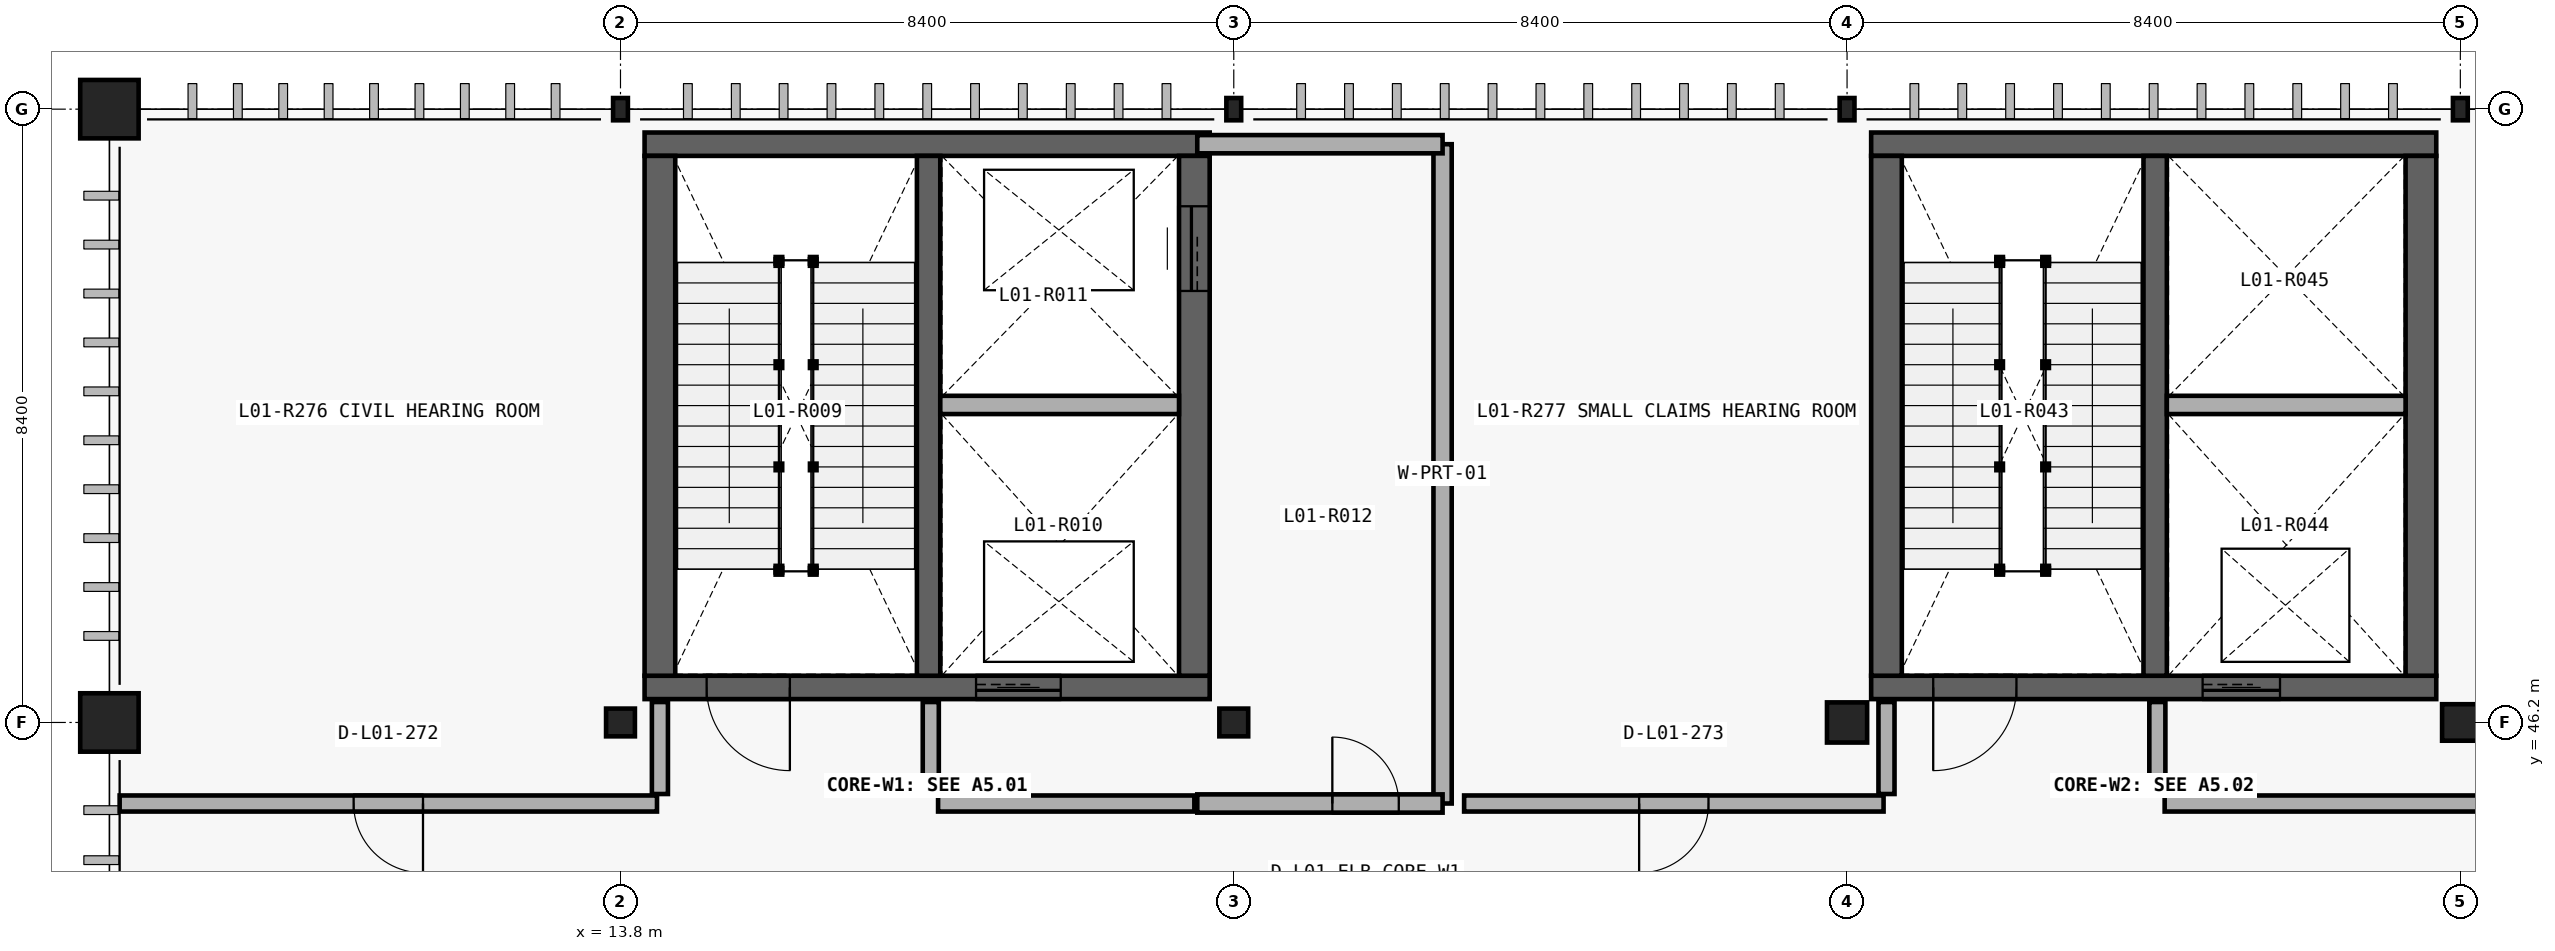
"""IFC4 building model, lengths in metres.
Left out: names, types, materials, properties, quantities, classifications, styles, units other than length and angle.
Written with IfcOpenShell. Run it as: python <this file> out.ifc"""

import sys

from ifc_helpers import new_model, si_unit, direction, frame, frame_2d, origin_with_axes, origin_2d_with_axis, place, context, subcontext, project, spatial, rectangle, hollow_rectangle, circle, i_section, extrude, element, fill, save


model = new_model("IFC4")
c1 = context("Model", 3, precision=1e-05, world=origin_with_axes(), true_north=direction((0.0, 1.0)))
c2 = subcontext(c1, "Body", "Model", "MODEL_VIEW")
j1 = project(units=[si_unit("LENGTHUNIT", "METRE"), si_unit("PLANEANGLEUNIT", "RADIAN")], contexts=[c1])
p1 = place(None, origin_with_axes())
s1 = spatial("IfcSite", under=j1, at=p1, CompositionType="ELEMENT")
p2 = place(p1, origin_with_axes())
s2 = spatial("IfcBuilding", under=s1, at=p2, CompositionType="ELEMENT")
p3 = place(p2, frame((0.0, 0.0, 5.4), z_axis=(0.0, 0.0, 1.0), x_axis=(1.0, 0.0, 0.0)))
s3 = spatial("IfcBuildingStorey", under=s2, at=p3, CompositionType="ELEMENT", Elevation=5.4)
p4 = place(None, frame((14.13, 46.68, 5.4), z_axis=(0.0, 0.0, 1.0), x_axis=(1.0, 0.0, 0.0)))
e1 = element("IfcWall", 1, at=p4, inside=s3, PredefinedType="SHEAR", context=c2, shape_type="SweptSolid", body=[
    extrude(rectangle(XDim=7.74, YDim=0.32, at=frame_2d((3.87, 0.0), x_axis=(1.0, 0.0))), origin_with_axes(), (0.0, 0.0, 1.0), 5.4),
])
p5 = place(None, frame((15.55, 46.68, 5.4), z_axis=(0.0, 0.0, 1.0), x_axis=(1.0, 0.0, 0.0)))
e2 = element("IfcOpeningElement", 2, at=p5, cuts=e1, PredefinedType="OPENING", context=c2, shape_type="SweptSolid", body=[
    extrude(rectangle(XDim=1.14, YDim=2.18, at=frame_2d((0.0, 1.09), x_axis=(1.0, 0.0))), frame((0.0, 0.17, 0.0), z_axis=(0.0, -1.0, 0.0), x_axis=(1.0, 0.0, 0.0)), (0.0, 0.0, 1.0), 0.34),
])
p6 = place(None, frame((19.25, 46.68, 5.4), z_axis=(0.0, 0.0, 1.0), x_axis=(1.0, 0.0, 0.0)))
e3 = element("IfcOpeningElement", 3, at=p6, cuts=e1, PredefinedType="OPENING", context=c2, shape_type="SweptSolid", body=[
    extrude(rectangle(XDim=1.16, YDim=2.2, at=frame_2d((0.0, 1.1), x_axis=(1.0, 0.0))), frame((0.0, 0.17, 0.0), z_axis=(0.0, -1.0, 0.0), x_axis=(1.0, 0.0, 0.0)), (0.0, 0.0, 1.0), 0.34),
])
p7 = place(None, frame((21.87, 54.12, 5.4), z_axis=(0.0, 0.0, 1.0), x_axis=(-1.0, 0.0, 0.0)))
e4 = element("IfcWall", 4, at=p7, inside=s3, PredefinedType="SHEAR", context=c2, shape_type="SweptSolid", body=[
    extrude(rectangle(XDim=7.74, YDim=0.32, at=frame_2d((3.87, 0.0), x_axis=(1.0, 0.0))), origin_with_axes(), (0.0, 0.0, 1.0), 5.4),
])
p8 = place(None, frame((21.66, 46.84, 5.4), z_axis=(0.0, 0.0, 1.0), x_axis=(0.0, 1.0, 0.0)))
e5 = element("IfcWall", 5, at=p8, inside=s3, PredefinedType="SHEAR", context=c2, shape_type="SweptSolid", body=[
    extrude(rectangle(XDim=7.12, YDim=0.42, at=frame_2d((3.56, 0.0), x_axis=(1.0, 0.0))), origin_with_axes(), (0.0, 0.0, 1.0), 5.4),
])
p9 = place(None, frame((21.66, 52.69, 5.4), z_axis=(0.0, 0.0, 1.0), x_axis=(0.0, 1.0, 0.0)))
e6 = element("IfcOpeningElement", 6, at=p9, cuts=e5, PredefinedType="OPENING", context=c2, shape_type="SweptSolid", body=[
    extrude(rectangle(XDim=1.16, YDim=2.2, at=frame_2d((0.0, 1.1), x_axis=(1.0, 0.0))), frame((0.0, 0.22, 0.0), z_axis=(0.0, -1.0, 0.0), x_axis=(1.0, 0.0, 0.0)), (0.0, 0.0, 1.0), 0.44),
])
p10 = place(None, frame((14.34, 53.96, 5.4), z_axis=(0.0, 0.0, 1.0), x_axis=(0.0, -1.0, 0.0)))
e7 = element("IfcWall", 7, at=p10, inside=s3, PredefinedType="SHEAR", context=c2, shape_type="SweptSolid", body=[
    extrude(rectangle(XDim=7.12, YDim=0.42, at=frame_2d((3.56, 0.0), x_axis=(1.0, 0.0))), origin_with_axes(), (0.0, 0.0, 1.0), 5.4),
])
p11 = place(None, frame((18.02, 46.84, 5.4), z_axis=(0.0, 0.0, 1.0), x_axis=(0.0, 1.0, 0.0)))
e8 = element("IfcWall", 8, at=p11, inside=s3, PredefinedType="SHEAR", context=c2, shape_type="SweptSolid", body=[
    extrude(rectangle(XDim=7.12, YDim=0.32, at=frame_2d((3.56, 0.0), x_axis=(1.0, 0.0))), origin_with_axes(), (0.0, 0.0, 1.0), 5.4),
])
p12 = place(None, frame((18.18, 50.549, 5.4), z_axis=(0.0, 0.0, 1.0), x_axis=(1.0, 0.0, 0.0)))
e9 = element("IfcWall", 9, at=p12, inside=s3, PredefinedType="PARTITIONING", context=c2, shape_type="SweptSolid", body=[
    extrude(rectangle(XDim=3.27, YDim=0.25, at=frame_2d((1.635, 0.0), x_axis=(1.0, 0.0))), origin_with_axes(), (0.0, 0.0, 1.0), 5.08),
])
p13 = place(None, frame((25.06, 45.09, 5.4), z_axis=(0.0, 0.0, 1.0), x_axis=(0.0, 1.0, 0.0)))
e10 = element("IfcWall", 10, at=p13, inside=s3, PredefinedType="PARTITIONING", context=c2, shape_type="SweptSolid", body=[
    extrude(rectangle(XDim=9.03, YDim=0.25, at=frame_2d((4.515, 0.0), x_axis=(1.0, 0.0))), origin_with_axes(), (0.0, 0.0, 1.0), 5.08),
])
p14 = place(None, frame((21.7, 54.12, 5.4), z_axis=(0.0, 0.0, 1.0), x_axis=(1.0, 0.0, 0.0)))
e11 = element("IfcWall", 11, at=p14, inside=s3, PredefinedType="PARTITIONING", context=c2, shape_type="SweptSolid", body=[
    extrude(rectangle(XDim=3.36, YDim=0.25, at=frame_2d((1.68, 0.0), x_axis=(1.0, 0.0))), origin_with_axes(), (0.0, 0.0, 1.0), 5.08),
])
p15 = place(None, frame((21.7, 45.09, 5.4), z_axis=(0.0, 0.0, 1.0), x_axis=(1.0, 0.0, 0.0)))
e12 = element("IfcWall", 12, at=p15, inside=s3, PredefinedType="PARTITIONING", context=c2, shape_type="SweptSolid", body=[
    extrude(rectangle(XDim=3.36, YDim=0.25, at=frame_2d((1.68, 0.0), x_axis=(1.0, 0.0))), origin_with_axes(), (0.0, 0.0, 1.0), 5.08),
])
p16 = place(None, frame((24.005, 45.09, 5.4), z_axis=(0.0, 0.0, 1.0), x_axis=(1.0, 0.0, 0.0)))
e13 = element("IfcOpeningElement", 13, at=p16, cuts=e12, PredefinedType="OPENING", context=c2, shape_type="SweptSolid", body=[
    extrude(rectangle(XDim=0.91, YDim=2.12, at=frame_2d((0.0, 1.06), x_axis=(1.0, 0.0))), frame((0.0, 0.135, 0.0), z_axis=(0.0, -1.0, 0.0), x_axis=(1.0, 0.0, 0.0)), (0.0, 0.0, 1.0), 0.27),
])
p17 = place(None, frame((30.93, 46.68, 5.4), z_axis=(0.0, 0.0, 1.0), x_axis=(1.0, 0.0, 0.0)))
e14 = element("IfcWall", 14, at=p17, inside=s3, PredefinedType="SHEAR", context=c2, shape_type="SweptSolid", body=[
    extrude(rectangle(XDim=7.74, YDim=0.32, at=frame_2d((3.87, 0.0), x_axis=(1.0, 0.0))), origin_with_axes(), (0.0, 0.0, 1.0), 5.4),
])
p18 = place(None, frame((32.35, 46.68, 5.4), z_axis=(0.0, 0.0, 1.0), x_axis=(1.0, 0.0, 0.0)))
e15 = element("IfcOpeningElement", 15, at=p18, cuts=e14, PredefinedType="OPENING", context=c2, shape_type="SweptSolid", body=[
    extrude(rectangle(XDim=1.14, YDim=2.18, at=frame_2d((0.0, 1.09), x_axis=(1.0, 0.0))), frame((0.0, 0.17, 0.0), z_axis=(0.0, -1.0, 0.0), x_axis=(1.0, 0.0, 0.0)), (0.0, 0.0, 1.0), 0.34),
])
p19 = place(None, frame((36.0, 46.68, 5.4), z_axis=(0.0, 0.0, 1.0), x_axis=(1.0, 0.0, 0.0)))
e16 = element("IfcOpeningElement", 16, at=p19, cuts=e14, PredefinedType="OPENING", context=c2, shape_type="SweptSolid", body=[
    extrude(rectangle(XDim=1.06, YDim=2.16, at=frame_2d((0.0, 1.08), x_axis=(1.0, 0.0))), frame((0.0, 0.17, 0.0), z_axis=(0.0, -1.0, 0.0), x_axis=(1.0, 0.0, 0.0)), (0.0, 0.0, 1.0), 0.34),
])
p20 = place(None, frame((38.67, 54.12, 5.4), z_axis=(0.0, 0.0, 1.0), x_axis=(-1.0, 0.0, 0.0)))
e17 = element("IfcWall", 17, at=p20, inside=s3, PredefinedType="SHEAR", context=c2, shape_type="SweptSolid", body=[
    extrude(rectangle(XDim=7.74, YDim=0.32, at=frame_2d((3.87, 0.0), x_axis=(1.0, 0.0))), origin_with_axes(), (0.0, 0.0, 1.0), 5.4),
])
for number, where, z_axis, x_axis in (
    (18, (38.46, 46.84, 5.4), (0.0, 0.0, 1.0), (0.0, 1.0, 0.0)),
    (19, (31.14, 53.96, 5.4), (0.0, 0.0, 1.0), (0.0, -1.0, 0.0)),
):
    element("IfcWall", number, at=place(None, frame(where, z_axis=z_axis, x_axis=x_axis)), inside=s3, PredefinedType="SHEAR", context=c2, shape_type="SweptSolid", body=[
        extrude(rectangle(XDim=7.12, YDim=0.42, at=frame_2d((3.56, 0.0), x_axis=(1.0, 0.0))), origin_with_axes(), (0.0, 0.0, 1.0), 5.4),
    ])
p21 = place(None, frame((34.82, 46.84, 5.4), z_axis=(0.0, 0.0, 1.0), x_axis=(0.0, 1.0, 0.0)))
e20 = element("IfcWall", 20, at=p21, inside=s3, PredefinedType="SHEAR", context=c2, shape_type="SweptSolid", body=[
    extrude(rectangle(XDim=7.12, YDim=0.32, at=frame_2d((3.56, 0.0), x_axis=(1.0, 0.0))), origin_with_axes(), (0.0, 0.0, 1.0), 5.4),
])
p22 = place(None, frame((34.98, 50.549, 5.4), z_axis=(0.0, 0.0, 1.0), x_axis=(1.0, 0.0, 0.0)))
e21 = element("IfcWall", 21, at=p22, inside=s3, PredefinedType="PARTITIONING", context=c2, shape_type="SweptSolid", body=[
    extrude(rectangle(XDim=3.27, YDim=0.25, at=frame_2d((1.635, 0.0), x_axis=(1.0, 0.0))), origin_with_axes(), (0.0, 0.0, 1.0), 5.08),
])
for number, where, z_axis, x_axis in (
    (22, (14.34, 45.22, 5.4), (0.0, 0.0, 1.0), (0.0, 1.0, 0.0)),
    (23, (18.05, 45.22, 5.4), (0.0, 0.0, 1.0), (0.0, 1.0, 0.0)),
    (24, (31.14, 45.22, 5.4), (0.0, 0.0, 1.0), (0.0, 1.0, 0.0)),
    (25, (34.85, 45.22, 5.4), (0.0, 0.0, 1.0), (0.0, 1.0, 0.0)),
):
    element("IfcWall", number, at=place(None, frame(where, z_axis=z_axis, x_axis=x_axis)), inside=s3, PredefinedType="PARTITIONING", context=c2, shape_type="SweptSolid", body=[
        extrude(rectangle(XDim=1.26, YDim=0.22, at=frame_2d((0.63, 0.0), x_axis=(1.0, 0.0))), origin_with_axes(), (0.0, 0.0, 1.0), 5.08),
    ])
p23 = place(None, frame((6.94, 45.09, 5.4), z_axis=(0.0, 0.0, 1.0), x_axis=(1.0, 0.0, 0.0)))
e26 = element("IfcWall", 26, at=p23, inside=s3, PredefinedType="PARTITIONING", context=c2, shape_type="SweptSolid", body=[
    extrude(rectangle(XDim=7.36, YDim=0.22, at=frame_2d((3.68, 0.0), x_axis=(1.0, 0.0))), origin_with_axes(), (0.0, 0.0, 1.0), 5.08),
])
p24 = place(None, frame((10.62, 45.09, 5.4), z_axis=(0.0, 0.0, 1.0), x_axis=(1.0, 0.0, 0.0)))
e27 = element("IfcOpeningElement", 27, at=p24, cuts=e26, PredefinedType="OPENING", context=c2, shape_type="SweptSolid", body=[
    extrude(rectangle(XDim=0.95, YDim=2.16, at=frame_2d((0.0, 1.08), x_axis=(1.0, 0.0))), frame((0.0, 0.12, 0.0), z_axis=(0.0, -1.0, 0.0), x_axis=(1.0, 0.0, 0.0)), (0.0, 0.0, 1.0), 0.24),
])
p25 = place(None, frame((18.15, 45.09, 5.4), z_axis=(0.0, 0.0, 1.0), x_axis=(1.0, 0.0, 0.0)))
e28 = element("IfcWall", 28, at=p25, inside=s3, PredefinedType="PARTITIONING", context=c2, shape_type="SweptSolid", body=[
    extrude(rectangle(XDim=3.51, YDim=0.22, at=frame_2d((1.755, 0.0), x_axis=(1.0, 0.0))), origin_with_axes(), (0.0, 0.0, 1.0), 5.08),
])
p26 = place(None, frame((25.355, 45.09, 5.4), z_axis=(0.0, 0.0, 1.0), x_axis=(1.0, 0.0, 0.0)))
e29 = element("IfcWall", 29, at=p26, inside=s3, PredefinedType="PARTITIONING", context=c2, shape_type="SweptSolid", body=[
    extrude(rectangle(XDim=5.745, YDim=0.22, at=frame_2d((2.873, 0.0), x_axis=(1.0, 0.0))), origin_with_axes(), (0.0, 0.0, 1.0), 5.08),
])
p27 = place(None, frame((28.227, 45.09, 5.4), z_axis=(0.0, 0.0, 1.0), x_axis=(1.0, 0.0, 0.0)))
e30 = element("IfcOpeningElement", 30, at=p27, cuts=e29, PredefinedType="OPENING", context=c2, shape_type="SweptSolid", body=[
    extrude(rectangle(XDim=0.95, YDim=2.16, at=frame_2d((0.0, 1.08), x_axis=(1.0, 0.0))), frame((0.0, 0.12, 0.0), z_axis=(0.0, -1.0, 0.0), x_axis=(1.0, 0.0, 0.0)), (0.0, 0.0, 1.0), 0.24),
])
p28 = place(None, frame((34.95, 45.09, 5.4), z_axis=(0.0, 0.0, 1.0), x_axis=(1.0, 0.0, 0.0)))
e31 = element("IfcWall", 31, at=p28, inside=s3, PredefinedType="PARTITIONING", context=c2, shape_type="SweptSolid", body=[
    extrude(rectangle(XDim=11.71, YDim=0.22, at=frame_2d((5.855, 0.0), x_axis=(1.0, 0.0))), origin_with_axes(), (0.0, 0.0, 1.0), 5.08),
])
p29 = place(None, frame((40.805, 45.09, 5.4), z_axis=(0.0, 0.0, 1.0), x_axis=(1.0, 0.0, 0.0)))
e32 = element("IfcOpeningElement", 32, at=p29, cuts=e31, PredefinedType="OPENING", context=c2, shape_type="SweptSolid", body=[
    extrude(rectangle(XDim=0.95, YDim=2.16, at=frame_2d((0.0, 1.08), x_axis=(1.0, 0.0))), frame((0.0, 0.12, 0.0), z_axis=(0.0, -1.0, 0.0), x_axis=(1.0, 0.0, 0.0)), (0.0, 0.0, 1.0), 0.24),
])
for number, where, z_axis, x_axis in (
    (33, (6.8, 46.2, 5.4), (0.0, 0.0, 1.0), (1.0, 0.0, 0.0)),
    (34, (6.8, 54.6, 5.4), (0.0, 0.0, 1.0), (1.0, 0.0, 0.0)),
):
    element("IfcColumn", number, at=place(None, frame(where, z_axis=z_axis, x_axis=x_axis)), inside=s3, PredefinedType="COLUMN", context=c2, shape_type="SweptSolid", body=[
        extrude(circle(Radius=0.4, at=origin_2d_with_axis()), origin_with_axes(), (0.0, 0.0, 1.0), 5.4),
    ])
p30 = place(None, frame((13.8, 46.2, 5.4), z_axis=(0.0, 0.0, 1.0), x_axis=(1.0, 0.0, 0.0)))
e35 = element("IfcColumn", 35, at=p30, inside=s3, PredefinedType="COLUMN", context=c2, shape_type="SweptSolid", body=[
    extrude(i_section(OverallWidth=0.395, OverallDepth=0.38, WebThickness=0.019, FlangeThickness=0.03, at=origin_2d_with_axis()), origin_with_axes(), (0.0, 0.0, 1.0), 5.4),
])
p31 = place(None, frame((13.8, 54.6, 5.4), z_axis=(0.0, 0.0, 1.0), x_axis=(1.0, 0.0, 0.0)))
e36 = element("IfcColumn", 36, at=p31, inside=s3, PredefinedType="COLUMN", context=c2, shape_type="SweptSolid", body=[
    extrude(hollow_rectangle(XDim=0.203, YDim=0.305, WallThickness=0.013, InnerFilletRadius=0.025, OuterFilletRadius=0.013, at=origin_2d_with_axis()), origin_with_axes(), (0.0, 0.0, 1.0), 5.4),
])
p32 = place(None, frame((22.2, 46.2, 5.4), z_axis=(0.0, 0.0, 1.0), x_axis=(1.0, 0.0, 0.0)))
e37 = element("IfcColumn", 37, at=p32, inside=s3, PredefinedType="COLUMN", context=c2, shape_type="SweptSolid", body=[
    extrude(i_section(OverallWidth=0.395, OverallDepth=0.38, WebThickness=0.019, FlangeThickness=0.03, at=origin_2d_with_axis()), origin_with_axes(), (0.0, 0.0, 1.0), 5.4),
])
p33 = place(None, frame((22.2, 54.6, 5.4), z_axis=(0.0, 0.0, 1.0), x_axis=(1.0, 0.0, 0.0)))
e38 = element("IfcColumn", 38, at=p33, inside=s3, PredefinedType="COLUMN", context=c2, shape_type="SweptSolid", body=[
    extrude(hollow_rectangle(XDim=0.203, YDim=0.305, WallThickness=0.013, InnerFilletRadius=0.025, OuterFilletRadius=0.013, at=origin_2d_with_axis()), origin_with_axes(), (0.0, 0.0, 1.0), 5.4),
])
p34 = place(None, frame((30.6, 46.2, 5.4), z_axis=(0.0, 0.0, 1.0), x_axis=(1.0, 0.0, 0.0)))
e39 = element("IfcColumn", 39, at=p34, inside=s3, PredefinedType="COLUMN", context=c2, shape_type="SweptSolid", body=[
    extrude(i_section(OverallWidth=0.55, OverallDepth=0.55, WebThickness=0.025, FlangeThickness=0.042, at=origin_2d_with_axis()), origin_with_axes(), (0.0, 0.0, 1.0), 5.4),
])
p35 = place(None, frame((30.6, 54.6, 5.4), z_axis=(0.0, 0.0, 1.0), x_axis=(1.0, 0.0, 0.0)))
e40 = element("IfcColumn", 40, at=p35, inside=s3, PredefinedType="COLUMN", context=c2, shape_type="SweptSolid", body=[
    extrude(hollow_rectangle(XDim=0.203, YDim=0.305, WallThickness=0.013, InnerFilletRadius=0.025, OuterFilletRadius=0.013, at=origin_2d_with_axis()), origin_with_axes(), (0.0, 0.0, 1.0), 5.4),
])
p36 = place(None, frame((39.0, 46.2, 5.4), z_axis=(0.0, 0.0, 1.0), x_axis=(1.0, 0.0, 0.0)))
e41 = element("IfcColumn", 41, at=p36, inside=s3, PredefinedType="COLUMN", context=c2, shape_type="SweptSolid", body=[
    extrude(i_section(OverallWidth=0.5, OverallDepth=0.5, WebThickness=0.022, FlangeThickness=0.036, at=origin_2d_with_axis()), origin_with_axes(), (0.0, 0.0, 1.0), 5.4),
])
p37 = place(None, frame((39.0, 54.6, 5.4), z_axis=(0.0, 0.0, 1.0), x_axis=(1.0, 0.0, 0.0)))
e42 = element("IfcColumn", 42, at=p37, inside=s3, PredefinedType="COLUMN", context=c2, shape_type="SweptSolid", body=[
    extrude(hollow_rectangle(XDim=0.203, YDim=0.305, WallThickness=0.013, InnerFilletRadius=0.025, OuterFilletRadius=0.013, at=origin_2d_with_axis()), origin_with_axes(), (0.0, 0.0, 1.0), 5.4),
])
p38 = place(None, frame((15.55, 46.68, 5.4), z_axis=(0.0, 0.0, 1.0), x_axis=(-1.0, 0.0, 0.0)))
e43 = element("IfcDoor", 43, at=p38, inside=s3, OperationType="SINGLE_SWING_RIGHT", PredefinedType="DOOR", context=c2, shape_type="SweptSolid", body=[
    extrude(rectangle(XDim=1.14, YDim=2.18, at=frame_2d((0.0, 1.09), x_axis=(1.0, 0.0))), frame((0.0, 0.04, 0.0), z_axis=(0.0, -1.0, 0.0), x_axis=(1.0, 0.0, 0.0)), (0.0, 0.0, 1.0), 0.08),
])
fill(e2, e43)
p39 = place(None, frame((19.25, 46.68, 5.4), z_axis=(0.0, 0.0, 1.0), x_axis=(-1.0, 0.0, 0.0)))
e44 = element("IfcDoor", 44, at=p39, inside=s3, OperationType="SLIDING_TO_LEFT", PredefinedType="DOOR", context=c2, shape_type="SweptSolid", body=[
    extrude(rectangle(XDim=1.16, YDim=2.2, at=frame_2d((0.0, 1.1), x_axis=(1.0, 0.0))), frame((0.0, 0.04, 0.0), z_axis=(0.0, -1.0, 0.0), x_axis=(1.0, 0.0, 0.0)), (0.0, 0.0, 1.0), 0.08),
])
fill(e3, e44)
p40 = place(None, frame((21.66, 52.69, 5.4), z_axis=(0.0, 0.0, 1.0), x_axis=(0.0, 1.0, 0.0)))
e45 = element("IfcDoor", 45, at=p40, inside=s3, OperationType="SLIDING_TO_LEFT", PredefinedType="DOOR", context=c2, shape_type="SweptSolid", body=[
    extrude(rectangle(XDim=1.16, YDim=2.2, at=frame_2d((0.0, 1.1), x_axis=(1.0, 0.0))), frame((0.0, 0.04, 0.0), z_axis=(0.0, -1.0, 0.0), x_axis=(1.0, 0.0, 0.0)), (0.0, 0.0, 1.0), 0.08),
])
fill(e6, e45)
p41 = place(None, frame((24.005, 45.09, 5.4), z_axis=(0.0, 0.0, 1.0), x_axis=(1.0, 0.0, 0.0)))
e46 = element("IfcDoor", 46, at=p41, inside=s3, OperationType="SINGLE_SWING_LEFT", PredefinedType="DOOR", context=c2, shape_type="SweptSolid", body=[
    extrude(rectangle(XDim=0.91, YDim=2.12, at=frame_2d((0.0, 1.06), x_axis=(1.0, 0.0))), frame((0.0, 0.04, 0.0), z_axis=(0.0, -1.0, 0.0), x_axis=(1.0, 0.0, 0.0)), (0.0, 0.0, 1.0), 0.08),
])
fill(e13, e46)
p42 = place(None, frame((32.35, 46.68, 5.4), z_axis=(0.0, 0.0, 1.0), x_axis=(-1.0, 0.0, 0.0)))
e47 = element("IfcDoor", 47, at=p42, inside=s3, OperationType="SINGLE_SWING_LEFT", PredefinedType="DOOR", context=c2, shape_type="SweptSolid", body=[
    extrude(rectangle(XDim=1.14, YDim=2.18, at=frame_2d((0.0, 1.09), x_axis=(1.0, 0.0))), frame((0.0, 0.04, 0.0), z_axis=(0.0, -1.0, 0.0), x_axis=(1.0, 0.0, 0.0)), (0.0, 0.0, 1.0), 0.08),
])
fill(e15, e47)
p43 = place(None, frame((36.0, 46.68, 5.4), z_axis=(0.0, 0.0, 1.0), x_axis=(-1.0, 0.0, 0.0)))
e48 = element("IfcDoor", 48, at=p43, inside=s3, OperationType="SLIDING_TO_LEFT", PredefinedType="DOOR", context=c2, shape_type="SweptSolid", body=[
    extrude(rectangle(XDim=1.06, YDim=2.16, at=frame_2d((0.0, 1.08), x_axis=(1.0, 0.0))), frame((0.0, 0.04, 0.0), z_axis=(0.0, -1.0, 0.0), x_axis=(1.0, 0.0, 0.0)), (0.0, 0.0, 1.0), 0.08),
])
fill(e16, e48)
p44 = place(None, frame((10.62, 45.09, 5.4), z_axis=(0.0, 0.0, 1.0), x_axis=(-1.0, 0.0, 0.0)))
e49 = element("IfcDoor", 49, at=p44, inside=s3, OperationType="SINGLE_SWING_RIGHT", PredefinedType="DOOR", context=c2, shape_type="SweptSolid", body=[
    extrude(rectangle(XDim=0.95, YDim=2.16, at=frame_2d((0.0, 1.08), x_axis=(1.0, 0.0))), frame((0.0, 0.04, 0.0), z_axis=(0.0, -1.0, 0.0), x_axis=(1.0, 0.0, 0.0)), (0.0, 0.0, 1.0), 0.08),
])
fill(e27, e49)
p45 = place(None, frame((28.227, 45.09, 5.4), z_axis=(0.0, 0.0, 1.0), x_axis=(-1.0, 0.0, 0.0)))
e50 = element("IfcDoor", 50, at=p45, inside=s3, OperationType="SINGLE_SWING_LEFT", PredefinedType="DOOR", context=c2, shape_type="SweptSolid", body=[
    extrude(rectangle(XDim=0.95, YDim=2.16, at=frame_2d((0.0, 1.08), x_axis=(1.0, 0.0))), frame((0.0, 0.04, 0.0), z_axis=(0.0, -1.0, 0.0), x_axis=(1.0, 0.0, 0.0)), (0.0, 0.0, 1.0), 0.08),
])
fill(e30, e50)
save(model, sys.argv[1])
